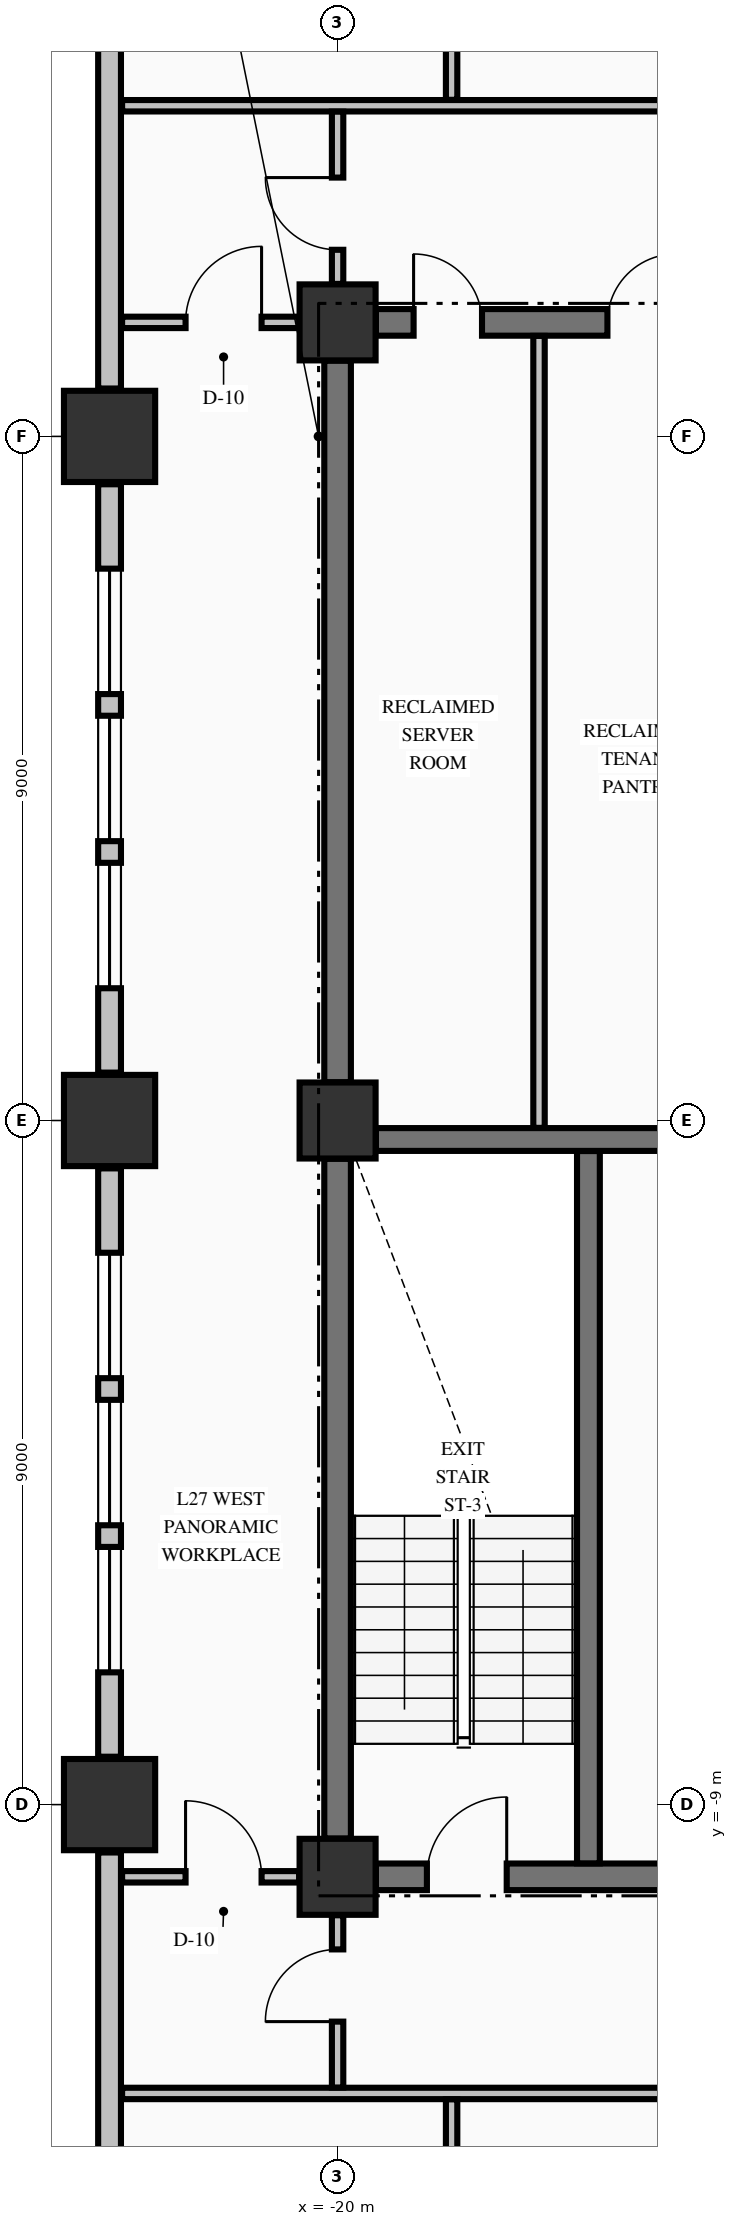
"""IFC4 building model, lengths in metres.
Left out: names, types, materials, properties, quantities, classifications, styles, units other than length and angle.
Written with IfcOpenShell. Run it as: python <this file> out.ifc"""

import sys

from ifc_helpers import new_model, si_unit, direction, frame, frame_2d, origin, origin_2d, place, context, subcontext, project, spatial, rectangle, extrude, element, fill, save


model = new_model("IFC4")
c1 = context("Model", 3, precision=1e-05, world=origin(), true_north=direction((0.0, 1.0)))
c2 = subcontext(c1, "Body", "Model", "MODEL_VIEW")
j1 = project(units=[si_unit("LENGTHUNIT", "METRE"), si_unit("PLANEANGLEUNIT", "RADIAN")], contexts=[c1])
p1 = place(None, origin())
s1 = spatial("IfcSite", under=j1, at=p1, CompositionType="ELEMENT")
p2 = place(p1, origin())
s2 = spatial("IfcBuilding", under=s1, at=p2, CompositionType="ELEMENT")
p3 = place(p2, frame((0.0, 0.0, 109.21)))
s3 = spatial("IfcBuildingStorey", under=s2, at=p3, CompositionType="ELEMENT", Elevation=109.21)
for number, where, z_axis, x_axis in (
    (1, (-23.0, -9.0, -0.25), (0.0, 0.0, 1.0), (1.0, 0.0, 0.0)),
    (2, (-23.0, 0.0, -0.25), (0.0, 0.0, 1.0), (1.0, 0.0, 0.0)),
    (3, (-23.0, 9.0, -0.25), (0.0, 0.0, 1.0), (1.0, 0.0, 0.0)),
):
    element("IfcColumn", number, at=place(p3, frame(where, z_axis=z_axis, x_axis=x_axis)), inside=s3, PredefinedType="COLUMN", context=c2, shape_type="SweptSolid", body=[
        extrude(rectangle(XDim=1.2, YDim=1.2, at=origin_2d()), origin(), (0.0, 0.0, 1.0), 3.57),
    ])
for number, where, z_axis, x_axis in (
    (4, (-20.0, -9.95, -0.25), (0.0, 0.0, 1.0), (1.0, 0.0, 0.0)),
    (5, (-20.0, 10.5, -0.25), (0.0, 0.0, 1.0), (1.0, 0.0, 0.0)),
    (6, (-20.0, 0.0, -0.25), (0.0, 0.0, 1.0), (1.0, 0.0, 0.0)),
):
    element("IfcColumn", number, at=place(p3, frame(where, z_axis=z_axis, x_axis=x_axis)), inside=s3, PredefinedType="COLUMN", context=c2, shape_type="SweptSolid", body=[
        extrude(rectangle(XDim=1.0, YDim=1.0, at=origin_2d()), origin(), (0.0, 0.0, 1.0), 3.57),
    ])
p4 = place(p3, frame((-23.0, -9.63, 0.0), z_axis=(0.0, 0.0, 1.0), x_axis=(0.0, -1.0, 0.0)))
e7 = element("IfcWall", 7, at=p4, inside=s3, PredefinedType="STANDARD", context=c2, shape_type="SweptSolid", body=[
    extrude(rectangle(XDim=10.74, YDim=0.3, at=frame_2d((5.37, 0.0))), origin(), (0.0, 0.0, 1.0), 2.712),
])
p5 = place(p3, frame((-23.0, -0.63, 0.0), z_axis=(0.0, 0.0, 1.0), x_axis=(0.0, -1.0, 0.0)))
e8 = element("IfcWall", 8, at=p5, inside=s3, PredefinedType="STANDARD", context=c2, shape_type="SweptSolid", body=[
    extrude(rectangle(XDim=7.74, YDim=0.3, at=frame_2d((3.87, 0.0))), origin(), (0.0, 0.0, 1.0), 2.712),
])
p6 = place(p5, frame((1.11, 0.0, 0.8)))
e9 = element("IfcOpeningElement", 9, at=p6, cuts=e8, PredefinedType="OPENING", context=c2, shape_type="SweptSolid", body=[
    extrude(rectangle(XDim=1.65, YDim=1.7, at=frame_2d((0.825, 0.85))), frame((0.0, 0.16, 0.0), z_axis=(0.0, -1.0, 0.0), x_axis=(1.0, 0.0, 0.0)), (0.0, 0.0, 1.0), 0.32),
])
p7 = place(p5, frame((3.045, 0.0, 0.8)))
e10 = element("IfcOpeningElement", 10, at=p7, cuts=e8, PredefinedType="OPENING", context=c2, shape_type="SweptSolid", body=[
    extrude(rectangle(XDim=1.65, YDim=1.7, at=frame_2d((0.825, 0.85))), frame((0.0, 0.16, 0.0), z_axis=(0.0, -1.0, 0.0), x_axis=(1.0, 0.0, 0.0)), (0.0, 0.0, 1.0), 0.32),
])
p8 = place(p5, frame((4.98, 0.0, 0.8)))
e11 = element("IfcOpeningElement", 11, at=p8, cuts=e8, PredefinedType="OPENING", context=c2, shape_type="SweptSolid", body=[
    extrude(rectangle(XDim=1.65, YDim=1.7, at=frame_2d((0.825, 0.85))), frame((0.0, 0.16, 0.0), z_axis=(0.0, -1.0, 0.0), x_axis=(1.0, 0.0, 0.0)), (0.0, 0.0, 1.0), 0.32),
])
p9 = place(p3, frame((-23.0, 8.37, 0.0), z_axis=(0.0, 0.0, 1.0), x_axis=(0.0, -1.0, 0.0)))
e12 = element("IfcWall", 12, at=p9, inside=s3, PredefinedType="STANDARD", context=c2, shape_type="SweptSolid", body=[
    extrude(rectangle(XDim=7.74, YDim=0.3, at=frame_2d((3.87, 0.0))), origin(), (0.0, 0.0, 1.0), 2.712),
])
p10 = place(p9, frame((1.11, 0.0, 0.8)))
e13 = element("IfcOpeningElement", 13, at=p10, cuts=e12, PredefinedType="OPENING", context=c2, shape_type="SweptSolid", body=[
    extrude(rectangle(XDim=1.65, YDim=1.7, at=frame_2d((0.825, 0.85))), frame((0.0, 0.16, 0.0), z_axis=(0.0, -1.0, 0.0), x_axis=(1.0, 0.0, 0.0)), (0.0, 0.0, 1.0), 0.32),
])
p11 = place(p9, frame((3.045, 0.0, 0.8)))
e14 = element("IfcOpeningElement", 14, at=p11, cuts=e12, PredefinedType="OPENING", context=c2, shape_type="SweptSolid", body=[
    extrude(rectangle(XDim=1.65, YDim=1.7, at=frame_2d((0.825, 0.85))), frame((0.0, 0.16, 0.0), z_axis=(0.0, -1.0, 0.0), x_axis=(1.0, 0.0, 0.0)), (0.0, 0.0, 1.0), 0.32),
])
p12 = place(p9, frame((4.98, 0.0, 0.8)))
e15 = element("IfcOpeningElement", 15, at=p12, cuts=e12, PredefinedType="OPENING", context=c2, shape_type="SweptSolid", body=[
    extrude(rectangle(XDim=1.65, YDim=1.7, at=frame_2d((0.825, 0.85))), frame((0.0, 0.16, 0.0), z_axis=(0.0, -1.0, 0.0), x_axis=(1.0, 0.0, 0.0)), (0.0, 0.0, 1.0), 0.32),
])
p13 = place(p3, frame((-23.0, 20.37, 0.0), z_axis=(0.0, 0.0, 1.0), x_axis=(0.0, -1.0, 0.0)))
e16 = element("IfcWall", 16, at=p13, inside=s3, PredefinedType="STANDARD", context=c2, shape_type="SweptSolid", body=[
    extrude(rectangle(XDim=10.74, YDim=0.3, at=frame_2d((5.37, 0.0))), origin(), (0.0, 0.0, 1.0), 2.712),
])
p14 = place(p3, frame((-19.496, -9.95, 0.0), z_axis=(0.0, 0.0, 1.0), x_axis=(1.0, 0.0, 0.0)))
e17 = element("IfcWall", 17, at=p14, inside=s3, PredefinedType="SHEAR", context=c2, shape_type="SweptSolid", body=[
    extrude(rectangle(XDim=4.796, YDim=0.35, at=frame_2d((2.398, 0.0))), origin(), (0.0, 0.0, 1.0), 3.32),
])
p15 = place(p14, frame((0.671, 0.0, 0.0)))
e18 = element("IfcOpeningElement", 18, at=p15, cuts=e17, PredefinedType="OPENING", context=c2, shape_type="SweptSolid", body=[
    extrude(rectangle(XDim=1.05, YDim=2.15, at=frame_2d((0.525, 1.075))), frame((0.0, 0.185, 0.0), z_axis=(0.0, -1.0, 0.0), x_axis=(1.0, 0.0, 0.0)), (0.0, 0.0, 1.0), 0.37),
])
p16 = place(p3, frame((-19.496, -0.25, 0.0), z_axis=(0.0, 0.0, 1.0), x_axis=(1.0, 0.0, 0.0)))
e19 = element("IfcWall", 19, at=p16, inside=s3, PredefinedType="SHEAR", context=c2, shape_type="SweptSolid", body=[
    extrude(rectangle(XDim=7.992, YDim=0.3, at=frame_2d((3.996, 0.0))), origin(), (0.0, 0.0, 1.0), 3.32),
])
p17 = place(p16, frame((5.796, 0.0, 0.0)))
e20 = element("IfcOpeningElement", 20, at=p17, cuts=e19, PredefinedType="OPENING", context=c2, shape_type="SweptSolid", body=[
    extrude(rectangle(XDim=1.1, YDim=2.15, at=frame_2d((0.55, 1.075))), frame((0.0, 0.16, 0.0), z_axis=(0.0, -1.0, 0.0), x_axis=(1.0, 0.0, 0.0)), (0.0, 0.0, 1.0), 0.32),
])
p18 = place(p3, frame((-19.496, 10.5, 0.0), z_axis=(0.0, 0.0, 1.0), x_axis=(1.0, 0.0, 0.0)))
e21 = element("IfcWall", 21, at=p18, inside=s3, PredefinedType="SHEAR", context=c2, shape_type="SweptSolid", body=[
    extrude(rectangle(XDim=4.796, YDim=0.35, at=frame_2d((2.398, 0.0))), origin(), (0.0, 0.0, 1.0), 3.32),
])
p19 = place(p18, frame((0.496, 0.0, 0.0)))
e22 = element("IfcOpeningElement", 22, at=p19, cuts=e21, PredefinedType="OPENING", context=c2, shape_type="SweptSolid", body=[
    extrude(rectangle(XDim=0.9, YDim=2.15, at=frame_2d((0.45, 1.075))), frame((0.0, 0.185, 0.0), z_axis=(0.0, -1.0, 0.0), x_axis=(1.0, 0.0, 0.0)), (0.0, 0.0, 1.0), 0.37),
])
p20 = place(p18, frame((3.046, 0.0, 0.0)))
e23 = element("IfcOpeningElement", 23, at=p20, cuts=e21, PredefinedType="OPENING", context=c2, shape_type="SweptSolid", body=[
    extrude(rectangle(XDim=0.9, YDim=2.15, at=frame_2d((0.45, 1.075))), frame((0.0, 0.185, 0.0), z_axis=(0.0, -1.0, 0.0), x_axis=(1.0, 0.0, 0.0)), (0.0, 0.0, 1.0), 0.37),
])
p21 = place(p3, frame((-22.835, -12.8, 0.0), z_axis=(0.0, 0.0, 1.0), x_axis=(1.0, 0.0, 0.0)))
e24 = element("IfcWall", 24, at=p21, inside=s3, PredefinedType="PARTITIONING", context=c2, shape_type="SweptSolid", body=[
    extrude(rectangle(XDim=50.67, YDim=0.15, at=frame_2d((25.335, 0.0))), origin(), (0.0, 0.0, 1.0), 3.32),
])
p22 = place(p21, frame((9.46, 0.0, 0.0)))
e25 = element("IfcOpeningElement", 25, at=p22, cuts=e24, PredefinedType="OPENING", context=c2, shape_type="SweptSolid", body=[
    extrude(rectangle(XDim=1.05, YDim=2.15, at=frame_2d((0.525, 1.075))), frame((0.0, 0.085, 0.0), z_axis=(0.0, -1.0, 0.0), x_axis=(1.0, 0.0, 0.0)), (0.0, 0.0, 1.0), 0.17),
])
p23 = place(p21, frame((17.86, 0.0, 0.0)))
e26 = element("IfcOpeningElement", 26, at=p23, cuts=e24, PredefinedType="OPENING", context=c2, shape_type="SweptSolid", body=[
    extrude(rectangle(XDim=0.95, YDim=2.15, at=frame_2d((0.475, 1.075))), frame((0.0, 0.085, 0.0), z_axis=(0.0, -1.0, 0.0), x_axis=(1.0, 0.0, 0.0)), (0.0, 0.0, 1.0), 0.17),
])
p24 = place(p21, frame((22.21, 0.0, 0.0)))
e27 = element("IfcOpeningElement", 27, at=p24, cuts=e24, PredefinedType="OPENING", context=c2, shape_type="SweptSolid", body=[
    extrude(rectangle(XDim=0.95, YDim=2.15, at=frame_2d((0.475, 1.075))), frame((0.0, 0.085, 0.0), z_axis=(0.0, -1.0, 0.0), x_axis=(1.0, 0.0, 0.0)), (0.0, 0.0, 1.0), 0.17),
])
p25 = place(p21, frame((31.51, 0.0, 0.0)))
e28 = element("IfcOpeningElement", 28, at=p25, cuts=e24, PredefinedType="OPENING", context=c2, shape_type="SweptSolid", body=[
    extrude(rectangle(XDim=1.05, YDim=2.15, at=frame_2d((0.525, 1.075))), frame((0.0, 0.085, 0.0), z_axis=(0.0, -1.0, 0.0), x_axis=(1.0, 0.0, 0.0)), (0.0, 0.0, 1.0), 0.17),
])
p26 = place(p21, frame((39.11, 0.0, 0.0)))
e29 = element("IfcOpeningElement", 29, at=p26, cuts=e24, PredefinedType="OPENING", context=c2, shape_type="SweptSolid", body=[
    extrude(rectangle(XDim=1.05, YDim=2.15, at=frame_2d((0.525, 1.075))), frame((0.0, 0.085, 0.0), z_axis=(0.0, -1.0, 0.0), x_axis=(1.0, 0.0, 0.0)), (0.0, 0.0, 1.0), 0.17),
])
p27 = place(p3, frame((-22.835, -9.95, 0.0), z_axis=(0.0, 0.0, 1.0), x_axis=(1.0, 0.0, 0.0)))
e30 = element("IfcWall", 30, at=p27, inside=s3, PredefinedType="PARTITIONING", context=c2, shape_type="SweptSolid", body=[
    extrude(rectangle(XDim=2.329, YDim=0.15, at=frame_2d((1.165, 0.0))), origin(), (0.0, 0.0, 1.0), 3.32),
])
p28 = place(p27, frame((0.835, 0.0, 0.0)))
e31 = element("IfcOpeningElement", 31, at=p28, cuts=e30, PredefinedType="OPENING", context=c2, shape_type="SweptSolid", body=[
    extrude(rectangle(XDim=1.0, YDim=2.15, at=frame_2d((0.5, 1.075))), frame((0.0, 0.085, 0.0), z_axis=(0.0, -1.0, 0.0), x_axis=(1.0, 0.0, 0.0)), (0.0, 0.0, 1.0), 0.17),
])
p29 = place(p3, frame((-22.835, 10.5, 0.0), z_axis=(0.0, 0.0, 1.0), x_axis=(1.0, 0.0, 0.0)))
e32 = element("IfcWall", 32, at=p29, inside=s3, PredefinedType="PARTITIONING", context=c2, shape_type="SweptSolid", body=[
    extrude(rectangle(XDim=2.329, YDim=0.15, at=frame_2d((1.165, 0.0))), origin(), (0.0, 0.0, 1.0), 3.32),
])
p30 = place(p29, frame((0.835, 0.0, 0.0)))
e33 = element("IfcOpeningElement", 33, at=p30, cuts=e32, PredefinedType="OPENING", context=c2, shape_type="SweptSolid", body=[
    extrude(rectangle(XDim=1.0, YDim=2.15, at=frame_2d((0.5, 1.075))), frame((0.0, 0.085, 0.0), z_axis=(0.0, -1.0, 0.0), x_axis=(1.0, 0.0, 0.0)), (0.0, 0.0, 1.0), 0.17),
])
p31 = place(p3, frame((-22.835, 13.35, 0.0), z_axis=(0.0, 0.0, 1.0), x_axis=(1.0, 0.0, 0.0)))
e34 = element("IfcWall", 34, at=p31, inside=s3, PredefinedType="PARTITIONING", context=c2, shape_type="SweptSolid", body=[
    extrude(rectangle(XDim=50.67, YDim=0.15, at=frame_2d((25.335, 0.0))), origin(), (0.0, 0.0, 1.0), 3.32),
])
p32 = place(p31, frame((15.86, 0.0, 0.0)))
e35 = element("IfcOpeningElement", 35, at=p32, cuts=e34, PredefinedType="OPENING", context=c2, shape_type="SweptSolid", body=[
    extrude(rectangle(XDim=1.05, YDim=2.15, at=frame_2d((0.525, 1.075))), frame((0.0, 0.085, 0.0), z_axis=(0.0, -1.0, 0.0), x_axis=(1.0, 0.0, 0.0)), (0.0, 0.0, 1.0), 0.17),
])
p33 = place(p31, frame((29.81, 0.0, 0.0)))
e36 = element("IfcOpeningElement", 36, at=p33, cuts=e34, PredefinedType="OPENING", context=c2, shape_type="SweptSolid", body=[
    extrude(rectangle(XDim=1.05, YDim=2.15, at=frame_2d((0.525, 1.075))), frame((0.0, 0.085, 0.0), z_axis=(0.0, -1.0, 0.0), x_axis=(1.0, 0.0, 0.0)), (0.0, 0.0, 1.0), 0.17),
])
p34 = place(p3, frame((-20.0, -9.446, 0.0), z_axis=(0.0, 0.0, 1.0), x_axis=(0.0, 1.0, 0.0)))
e37 = element("IfcWall", 37, at=p34, inside=s3, PredefinedType="SHEAR", context=c2, shape_type="SweptSolid", body=[
    extrude(rectangle(XDim=8.942, YDim=0.35, at=frame_2d((4.471, 0.0))), origin(), (0.0, 0.0, 1.0), 3.32),
])
p35 = place(p3, frame((-20.0, 0.504, 0.0), z_axis=(0.0, 0.0, 1.0), x_axis=(0.0, 1.0, 0.0)))
e38 = element("IfcWall", 38, at=p35, inside=s3, PredefinedType="SHEAR", context=c2, shape_type="SweptSolid", body=[
    extrude(rectangle(XDim=9.492, YDim=0.35, at=frame_2d((4.746, 0.0))), origin(), (0.0, 0.0, 1.0), 3.32),
])
p36 = place(p3, frame((-16.7, -9.773, 0.0), z_axis=(0.0, 0.0, 1.0), x_axis=(0.0, 1.0, 0.0)))
e39 = element("IfcWall", 39, at=p36, inside=s3, PredefinedType="SHEAR", context=c2, shape_type="SweptSolid", body=[
    extrude(rectangle(XDim=9.371, YDim=0.3, at=frame_2d((4.686, 0.0))), origin(), (0.0, 0.0, 1.0), 3.32),
])
p37 = place(p3, frame((-20.0, -12.722, 0.0), z_axis=(0.0, 0.0, 1.0), x_axis=(0.0, 1.0, 0.0)))
e40 = element("IfcWall", 40, at=p37, inside=s3, PredefinedType="PARTITIONING", context=c2, shape_type="SweptSolid", body=[
    extrude(rectangle(XDim=2.266, YDim=0.15, at=frame_2d((1.133, 0.0))), origin(), (0.0, 0.0, 1.0), 2.81),
])
p38 = place(p37, frame((0.867, 0.0, 0.0)))
e41 = element("IfcOpeningElement", 41, at=p38, cuts=e40, PredefinedType="OPENING", context=c2, shape_type="SweptSolid", body=[
    extrude(rectangle(XDim=0.95, YDim=2.15, at=frame_2d((0.475, 1.075))), frame((0.0, 0.085, 0.0), z_axis=(0.0, -1.0, 0.0), x_axis=(1.0, 0.0, 0.0)), (0.0, 0.0, 1.0), 0.17),
])
p39 = place(p3, frame((-20.0, 11.006, 0.0), z_axis=(0.0, 0.0, 1.0), x_axis=(0.0, 1.0, 0.0)))
e42 = element("IfcWall", 42, at=p39, inside=s3, PredefinedType="PARTITIONING", context=c2, shape_type="SweptSolid", body=[
    extrude(rectangle(XDim=2.266, YDim=0.15, at=frame_2d((1.133, 0.0))), origin(), (0.0, 0.0, 1.0), 2.81),
])
p40 = place(p39, frame((0.449, 0.0, 0.0)))
e43 = element("IfcOpeningElement", 43, at=p40, cuts=e42, PredefinedType="OPENING", context=c2, shape_type="SweptSolid", body=[
    extrude(rectangle(XDim=0.95, YDim=2.15, at=frame_2d((0.475, 1.075))), frame((0.0, 0.085, 0.0), z_axis=(0.0, -1.0, 0.0), x_axis=(1.0, 0.0, 0.0)), (0.0, 0.0, 1.0), 0.17),
])
p41 = place(p3, frame((-18.5, -20.394, 0.0), z_axis=(0.0, 0.0, 1.0), x_axis=(0.0, 1.0, 0.0)))
e44 = element("IfcWall", 44, at=p41, inside=s3, PredefinedType="PARTITIONING", context=c2, shape_type="SweptSolid", body=[
    extrude(rectangle(XDim=7.516, YDim=0.15, at=frame_2d((3.758, 0.0))), origin(), (0.0, 0.0, 1.0), 3.32),
])
p42 = place(p3, frame((-18.5, 13.428, 0.0), z_axis=(0.0, 0.0, 1.0), x_axis=(0.0, 1.0, 0.0)))
e45 = element("IfcWall", 45, at=p42, inside=s3, PredefinedType="PARTITIONING", context=c2, shape_type="SweptSolid", body=[
    extrude(rectangle(XDim=6.966, YDim=0.15, at=frame_2d((3.483, 0.0))), origin(), (0.0, 0.0, 1.0), 3.32),
])
p43 = place(p3, frame((-17.35, -0.097, 0.0), z_axis=(0.0, 0.0, 1.0), x_axis=(0.0, 1.0, 0.0)))
e46 = element("IfcWall", 46, at=p43, inside=s3, PredefinedType="PARTITIONING", context=c2, shape_type="SweptSolid", body=[
    extrude(rectangle(XDim=10.419, YDim=0.15, at=frame_2d((5.209, 0.0))), origin(), (0.0, 0.0, 1.0), 3.32),
])
p44 = place(p6, origin())
e47 = element("IfcWindow", 47, at=p44, inside=s3, PartitioningType="SINGLE_PANEL", PredefinedType="WINDOW", context=c2, shape_type="SweptSolid", body=[
    extrude(rectangle(XDim=1.65, YDim=1.7, at=frame_2d((0.825, 0.85))), frame((0.0, 0.03, 0.0), z_axis=(0.0, -1.0, 0.0), x_axis=(1.0, 0.0, 0.0)), (0.0, 0.0, 1.0), 0.06),
])
fill(e9, e47)
p45 = place(p7, origin())
e48 = element("IfcWindow", 48, at=p45, inside=s3, PartitioningType="SINGLE_PANEL", PredefinedType="WINDOW", context=c2, shape_type="SweptSolid", body=[
    extrude(rectangle(XDim=1.65, YDim=1.7, at=frame_2d((0.825, 0.85))), frame((0.0, 0.03, 0.0), z_axis=(0.0, -1.0, 0.0), x_axis=(1.0, 0.0, 0.0)), (0.0, 0.0, 1.0), 0.06),
])
fill(e10, e48)
p46 = place(p8, origin())
e49 = element("IfcWindow", 49, at=p46, inside=s3, PartitioningType="SINGLE_PANEL", PredefinedType="WINDOW", context=c2, shape_type="SweptSolid", body=[
    extrude(rectangle(XDim=1.65, YDim=1.7, at=frame_2d((0.825, 0.85))), frame((0.0, 0.03, 0.0), z_axis=(0.0, -1.0, 0.0), x_axis=(1.0, 0.0, 0.0)), (0.0, 0.0, 1.0), 0.06),
])
fill(e11, e49)
p47 = place(p10, origin())
e50 = element("IfcWindow", 50, at=p47, inside=s3, PartitioningType="SINGLE_PANEL", PredefinedType="WINDOW", context=c2, shape_type="SweptSolid", body=[
    extrude(rectangle(XDim=1.65, YDim=1.7, at=frame_2d((0.825, 0.85))), frame((0.0, 0.03, 0.0), z_axis=(0.0, -1.0, 0.0), x_axis=(1.0, 0.0, 0.0)), (0.0, 0.0, 1.0), 0.06),
])
fill(e13, e50)
p48 = place(p11, origin())
e51 = element("IfcWindow", 51, at=p48, inside=s3, PartitioningType="SINGLE_PANEL", PredefinedType="WINDOW", context=c2, shape_type="SweptSolid", body=[
    extrude(rectangle(XDim=1.65, YDim=1.7, at=frame_2d((0.825, 0.85))), frame((0.0, 0.03, 0.0), z_axis=(0.0, -1.0, 0.0), x_axis=(1.0, 0.0, 0.0)), (0.0, 0.0, 1.0), 0.06),
])
fill(e14, e51)
p49 = place(p12, origin())
e52 = element("IfcWindow", 52, at=p49, inside=s3, PartitioningType="SINGLE_PANEL", PredefinedType="WINDOW", context=c2, shape_type="SweptSolid", body=[
    extrude(rectangle(XDim=1.65, YDim=1.7, at=frame_2d((0.825, 0.85))), frame((0.0, 0.03, 0.0), z_axis=(0.0, -1.0, 0.0), x_axis=(1.0, 0.0, 0.0)), (0.0, 0.0, 1.0), 0.06),
])
fill(e15, e52)
p50 = place(p15, origin())
e53 = element("IfcDoor", 53, at=p50, inside=s3, OperationType="SINGLE_SWING_RIGHT", PredefinedType="DOOR", context=c2, shape_type="SweptSolid", body=[
    extrude(rectangle(XDim=1.05, YDim=2.15, at=frame_2d((0.525, 1.075))), frame((0.0, 0.025, 0.0), z_axis=(0.0, -1.0, 0.0), x_axis=(1.0, 0.0, 0.0)), (0.0, 0.0, 1.0), 0.05),
])
fill(e18, e53)
p51 = place(p19, origin())
e54 = element("IfcDoor", 54, at=p51, inside=s3, OperationType="SINGLE_SWING_LEFT", PredefinedType="DOOR", context=c2, shape_type="SweptSolid", body=[
    extrude(rectangle(XDim=0.9, YDim=2.15, at=frame_2d((0.45, 1.075))), frame((0.0, 0.025, 0.0), z_axis=(0.0, -1.0, 0.0), x_axis=(1.0, 0.0, 0.0)), (0.0, 0.0, 1.0), 0.05),
])
fill(e22, e54)
p52 = place(p20, origin())
e55 = element("IfcDoor", 55, at=p52, inside=s3, OperationType="SINGLE_SWING_RIGHT", PredefinedType="DOOR", context=c2, shape_type="SweptSolid", body=[
    extrude(rectangle(XDim=0.9, YDim=2.15, at=frame_2d((0.45, 1.075))), frame((0.0, 0.025, 0.0), z_axis=(0.0, -1.0, 0.0), x_axis=(1.0, 0.0, 0.0)), (0.0, 0.0, 1.0), 0.05),
])
fill(e23, e55)
p53 = place(p40, origin())
e56 = element("IfcDoor", 56, at=p53, inside=s3, OperationType="SINGLE_SWING_RIGHT", PredefinedType="DOOR", context=c2, shape_type="SweptSolid", body=[
    extrude(rectangle(XDim=0.95, YDim=2.15, at=frame_2d((0.475, 1.075))), frame((0.0, 0.025, 0.0), z_axis=(0.0, -1.0, 0.0), x_axis=(1.0, 0.0, 0.0)), (0.0, 0.0, 1.0), 0.05),
])
fill(e43, e56)
p54 = place(p38, origin())
e57 = element("IfcDoor", 57, at=p54, inside=s3, OperationType="SINGLE_SWING_LEFT", PredefinedType="DOOR", context=c2, shape_type="SweptSolid", body=[
    extrude(rectangle(XDim=0.95, YDim=2.15, at=frame_2d((0.475, 1.075))), frame((0.0, 0.025, 0.0), z_axis=(0.0, -1.0, 0.0), x_axis=(1.0, 0.0, 0.0)), (0.0, 0.0, 1.0), 0.05),
])
fill(e41, e57)
p55 = place(p30, origin())
e58 = element("IfcDoor", 58, at=p55, inside=s3, OperationType="SINGLE_SWING_RIGHT", PredefinedType="DOOR", context=c2, shape_type="SweptSolid", body=[
    extrude(rectangle(XDim=1.0, YDim=2.15, at=frame_2d((0.5, 1.075))), frame((0.0, 0.025, 0.0), z_axis=(0.0, -1.0, 0.0), x_axis=(1.0, 0.0, 0.0)), (0.0, 0.0, 1.0), 0.05),
])
fill(e33, e58)
p56 = place(p28, origin())
e59 = element("IfcDoor", 59, at=p56, inside=s3, OperationType="SINGLE_SWING_LEFT", PredefinedType="DOOR", context=c2, shape_type="SweptSolid", body=[
    extrude(rectangle(XDim=1.0, YDim=2.15, at=frame_2d((0.5, 1.075))), frame((0.0, 0.025, 0.0), z_axis=(0.0, -1.0, 0.0), x_axis=(1.0, 0.0, 0.0)), (0.0, 0.0, 1.0), 0.05),
])
fill(e31, e59)
save(model, sys.argv[1])
